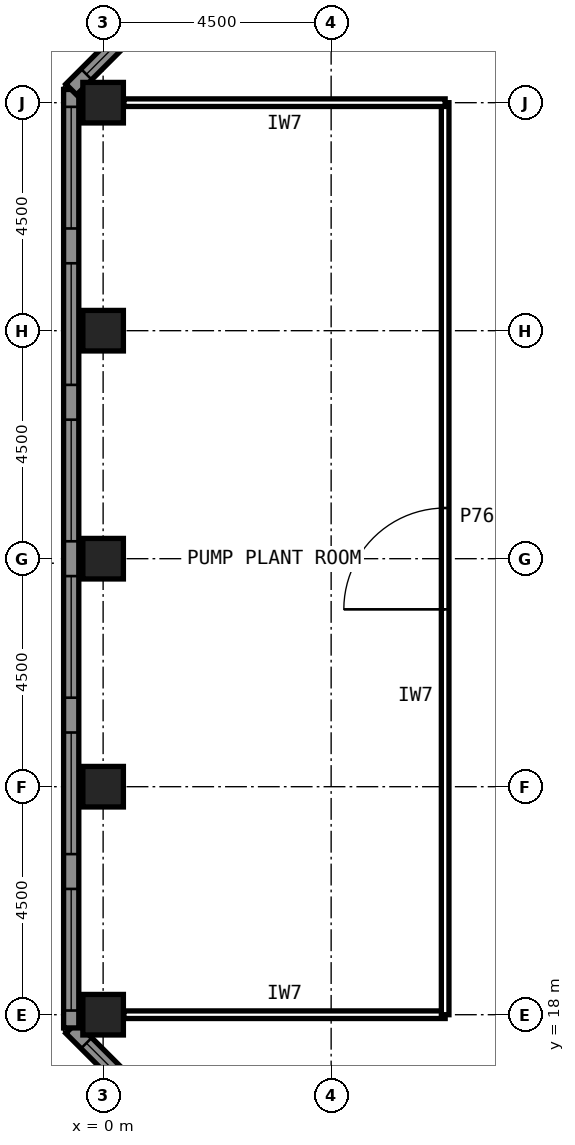
"""IFC4 building model, lengths in metres.
Left out: names, types, materials, properties, quantities, classifications, styles, units other than length and angle.
Written with IfcOpenShell. Run it as: python <this file> out.ifc"""

import sys

from ifc_helpers import new_model, si_unit, direction, frame, frame_2d, origin, origin_2d, place, context, subcontext, project, spatial, polyline, rectangle, hollow_rectangle, outline, extrude, element, fill, save


model = new_model("IFC4")
c1 = context("Model", 3, precision=1e-05, world=origin(), true_north=direction((0.0, 1.0)))
c2 = subcontext(c1, "Body", "Model", "MODEL_VIEW")
j1 = project(units=[si_unit("LENGTHUNIT", "METRE"), si_unit("PLANEANGLEUNIT", "RADIAN")], contexts=[c1])
p1 = place(None, origin())
s1 = spatial("IfcSite", under=j1, at=p1, CompositionType="ELEMENT")
p2 = place(p1, origin())
s2 = spatial("IfcBuilding", under=s1, at=p2, CompositionType="ELEMENT")
p3 = place(p2, frame((0.0, 0.0, 320.1)))
s3 = spatial("IfcBuildingStorey", under=s2, at=p3, CompositionType="ELEMENT", Elevation=320.1)
p4 = place(p3, frame((0.0, 36.0, 0.0), z_axis=(0.0, 0.0, 1.0), x_axis=(1.0, 0.0, 0.0)))
e1 = element("IfcColumn", 1, at=p4, inside=s3, PredefinedType="COLUMN", context=c2, shape_type="SweptSolid", body=[
    extrude(hollow_rectangle(XDim=0.8, YDim=0.8, WallThickness=0.045, at=origin_2d()), origin(), (0.0, 0.0, 1.0), 15.1),
])
p5 = place(p3, frame((0.0, 31.5, 0.0), z_axis=(0.0, 0.0, 1.0), x_axis=(1.0, 0.0, 0.0)))
e2 = element("IfcColumn", 2, at=p5, inside=s3, PredefinedType="COLUMN", context=c2, shape_type="SweptSolid", body=[
    extrude(hollow_rectangle(XDim=0.8, YDim=0.8, WallThickness=0.045, at=origin_2d()), origin(), (0.0, 0.0, 1.0), 14.677),
])
p6 = place(p3, frame((0.0, 27.0, 0.0), z_axis=(0.0, 0.0, 1.0), x_axis=(1.0, 0.0, 0.0)))
e3 = element("IfcColumn", 3, at=p6, inside=s3, PredefinedType="COLUMN", context=c2, shape_type="SweptSolid", body=[
    extrude(hollow_rectangle(XDim=0.8, YDim=0.8, WallThickness=0.045, at=origin_2d()), origin(), (0.0, 0.0, 1.0), 12.189),
])
p7 = place(p3, frame((0.0, 22.5, 0.0), z_axis=(0.0, 0.0, 1.0), x_axis=(1.0, 0.0, 0.0)))
e4 = element("IfcColumn", 4, at=p7, inside=s3, PredefinedType="COLUMN", context=c2, shape_type="SweptSolid", body=[
    extrude(hollow_rectangle(XDim=0.8, YDim=0.8, WallThickness=0.045, at=origin_2d()), origin(), (0.0, 0.0, 1.0), 11.977),
])
p8 = place(p3, frame((0.0, 18.0, 0.0), z_axis=(0.0, 0.0, 1.0), x_axis=(1.0, 0.0, 0.0)))
e5 = element("IfcColumn", 5, at=p8, inside=s3, PredefinedType="COLUMN", context=c2, shape_type="SweptSolid", body=[
    extrude(hollow_rectangle(XDim=0.8, YDim=0.8, WallThickness=0.045, at=origin_2d()), origin(), (0.0, 0.0, 1.0), 9.7),
])
p9 = place(p3, frame((17.739, -0.63, 0.0), z_axis=(0.0, 0.0, 1.0), x_axis=(-0.707106781187, 0.707106781187, 0.0)))
e6 = element("IfcWall", 6, at=p9, inside=s3, PredefinedType="SOLIDWALL", context=c2, shape_type="SweptSolid", body=[
    extrude(outline(polyline([(0.0, 0.0), (25.978, 0.0), (25.978, 12.722), (0.0, 7.211), (0.0, 0.0)])), frame((0.0, 0.15, 0.0), z_axis=(0.0, -1.0, 0.0), x_axis=(1.0, 0.0, 0.0)), (0.0, 0.0, 1.0), 0.3),
])
p10 = place(p9, frame((0.424, 0.0, 1.2)))
e7 = element("IfcOpeningElement", 7, at=p10, cuts=e6, PredefinedType="OPENING", context=c2, shape_type="SweptSolid", body=[
    extrude(rectangle(XDim=2.4, YDim=2.4, at=frame_2d((1.2, 1.2))), frame((0.0, 0.16, 0.0), z_axis=(0.0, -1.0, 0.0), x_axis=(1.0, 0.0, 0.0)), (0.0, 0.0, 1.0), 0.32),
])
p11 = place(p9, frame((3.671, 0.0, 1.2)))
e8 = element("IfcOpeningElement", 8, at=p11, cuts=e6, PredefinedType="OPENING", context=c2, shape_type="SweptSolid", body=[
    extrude(rectangle(XDim=2.4, YDim=2.4, at=frame_2d((1.2, 1.2))), frame((0.0, 0.16, 0.0), z_axis=(0.0, -1.0, 0.0), x_axis=(1.0, 0.0, 0.0)), (0.0, 0.0, 1.0), 0.32),
])
p12 = place(p9, frame((6.918, 0.0, 1.2)))
e9 = element("IfcOpeningElement", 9, at=p12, cuts=e6, PredefinedType="OPENING", context=c2, shape_type="SweptSolid", body=[
    extrude(rectangle(XDim=2.4, YDim=2.4, at=frame_2d((1.2, 1.2))), frame((0.0, 0.16, 0.0), z_axis=(0.0, -1.0, 0.0), x_axis=(1.0, 0.0, 0.0)), (0.0, 0.0, 1.0), 0.32),
])
p13 = place(p9, frame((10.165, 0.0, 1.2)))
e10 = element("IfcOpeningElement", 10, at=p13, cuts=e6, PredefinedType="OPENING", context=c2, shape_type="SweptSolid", body=[
    extrude(rectangle(XDim=2.4, YDim=2.4, at=frame_2d((1.2, 1.2))), frame((0.0, 0.16, 0.0), z_axis=(0.0, -1.0, 0.0), x_axis=(1.0, 0.0, 0.0)), (0.0, 0.0, 1.0), 0.32),
])
p14 = place(p9, frame((13.412, 0.0, 5.25)))
e11 = element("IfcOpeningElement", 11, at=p14, cuts=e6, PredefinedType="OPENING", context=c2, shape_type="SweptSolid", body=[
    extrude(rectangle(XDim=2.4, YDim=2.4, at=frame_2d((1.2, 1.2))), frame((0.0, 0.16, 0.0), z_axis=(0.0, -1.0, 0.0), x_axis=(1.0, 0.0, 0.0)), (0.0, 0.0, 1.0), 0.32),
])
p15 = place(p9, frame((16.66, 0.0, 5.35)))
e12 = element("IfcOpeningElement", 12, at=p15, cuts=e6, PredefinedType="OPENING", context=c2, shape_type="SweptSolid", body=[
    extrude(rectangle(XDim=2.4, YDim=2.4, at=frame_2d((1.2, 1.2))), frame((0.0, 0.16, 0.0), z_axis=(0.0, -1.0, 0.0), x_axis=(1.0, 0.0, 0.0)), (0.0, 0.0, 1.0), 0.32),
])
p16 = place(p9, frame((19.907, 0.0, 1.2)))
e13 = element("IfcOpeningElement", 13, at=p16, cuts=e6, PredefinedType="OPENING", context=c2, shape_type="SweptSolid", body=[
    extrude(rectangle(XDim=2.4, YDim=2.4, at=frame_2d((1.2, 1.2))), frame((0.0, 0.16, 0.0), z_axis=(0.0, -1.0, 0.0), x_axis=(1.0, 0.0, 0.0)), (0.0, 0.0, 1.0), 0.32),
])
p17 = place(p9, frame((23.154, 0.0, 1.2)))
e14 = element("IfcOpeningElement", 14, at=p17, cuts=e6, PredefinedType="OPENING", context=c2, shape_type="SweptSolid", body=[
    extrude(rectangle(XDim=2.4, YDim=2.4, at=frame_2d((1.2, 1.2))), frame((0.0, 0.16, 0.0), z_axis=(0.0, -1.0, 0.0), x_axis=(1.0, 0.0, 0.0)), (0.0, 0.0, 1.0), 0.32),
])
p18 = place(p3, frame((-0.63, 17.739, 0.0), z_axis=(0.0, 0.0, 1.0), x_axis=(0.0, 1.0, 0.0)))
e15 = element("IfcWall", 15, at=p18, inside=s3, PredefinedType="SOLIDWALL", context=c2, shape_type="SweptSolid", body=[
    extrude(outline(polyline([(0.0, 0.0), (18.522, 0.0), (18.522, 18.278), (0.0, 12.722), (0.0, 0.0)])), frame((0.0, 0.15, 0.0), z_axis=(0.0, -1.0, 0.0), x_axis=(1.0, 0.0, 0.0)), (0.0, 0.0, 1.0), 0.3),
])
p19 = place(p18, frame((0.344, 0.0, 5.45)))
e16 = element("IfcOpeningElement", 16, at=p19, cuts=e15, PredefinedType="OPENING", context=c2, shape_type="SweptSolid", body=[
    extrude(rectangle(XDim=2.4, YDim=2.4, at=frame_2d((1.2, 1.2))), frame((0.0, 0.16, 0.0), z_axis=(0.0, -1.0, 0.0), x_axis=(1.0, 0.0, 0.0)), (0.0, 0.0, 1.0), 0.32),
])
p20 = place(p18, frame((3.43, 0.0, 1.65)))
e17 = element("IfcOpeningElement", 17, at=p20, cuts=e15, PredefinedType="OPENING", context=c2, shape_type="SweptSolid", body=[
    extrude(rectangle(XDim=2.4, YDim=2.4, at=frame_2d((1.2, 1.2))), frame((0.0, 0.16, 0.0), z_axis=(0.0, -1.0, 0.0), x_axis=(1.0, 0.0, 0.0)), (0.0, 0.0, 1.0), 0.32),
])
p21 = place(p18, frame((6.518, 0.0, 5.15)))
e18 = element("IfcOpeningElement", 18, at=p21, cuts=e15, PredefinedType="OPENING", context=c2, shape_type="SweptSolid", body=[
    extrude(rectangle(XDim=2.4, YDim=2.4, at=frame_2d((1.2, 1.2))), frame((0.0, 0.16, 0.0), z_axis=(0.0, -1.0, 0.0), x_axis=(1.0, 0.0, 0.0)), (0.0, 0.0, 1.0), 0.32),
])
p22 = place(p18, frame((9.604, 0.0, 1.2)))
e19 = element("IfcOpeningElement", 19, at=p22, cuts=e15, PredefinedType="OPENING", context=c2, shape_type="SweptSolid", body=[
    extrude(rectangle(XDim=2.4, YDim=2.4, at=frame_2d((1.2, 1.2))), frame((0.0, 0.16, 0.0), z_axis=(0.0, -1.0, 0.0), x_axis=(1.0, 0.0, 0.0)), (0.0, 0.0, 1.0), 0.32),
])
p23 = place(p18, frame((12.691, 0.0, 1.2)))
e20 = element("IfcOpeningElement", 20, at=p23, cuts=e15, PredefinedType="OPENING", context=c2, shape_type="SweptSolid", body=[
    extrude(rectangle(XDim=2.4, YDim=2.4, at=frame_2d((1.2, 1.2))), frame((0.0, 0.16, 0.0), z_axis=(0.0, -1.0, 0.0), x_axis=(1.0, 0.0, 0.0)), (0.0, 0.0, 1.0), 0.32),
])
p24 = place(p18, frame((15.779, 0.0, 1.2)))
e21 = element("IfcOpeningElement", 21, at=p24, cuts=e15, PredefinedType="OPENING", context=c2, shape_type="SweptSolid", body=[
    extrude(rectangle(XDim=2.4, YDim=2.4, at=frame_2d((1.2, 1.2))), frame((0.0, 0.16, 0.0), z_axis=(0.0, -1.0, 0.0), x_axis=(1.0, 0.0, 0.0)), (0.0, 0.0, 1.0), 0.32),
])
p25 = place(p3, frame((-0.63, 36.261, 0.0), z_axis=(0.0, 0.0, 1.0), x_axis=(0.707106781187, 0.707106781187, 0.0)))
e22 = element("IfcWall", 22, at=p25, inside=s3, PredefinedType="SOLIDWALL", context=c2, shape_type="SweptSolid", body=[
    extrude(outline(polyline([(0.0, 0.0), (25.978, 0.0), (25.978, 23.789), (0.0, 18.278), (0.0, 0.0)])), frame((0.0, 0.15, 0.0), z_axis=(0.0, -1.0, 0.0), x_axis=(1.0, 0.0, 0.0)), (0.0, 0.0, 1.0), 0.3),
])
p26 = place(p25, frame((0.424, 0.0, 1.2)))
e23 = element("IfcOpeningElement", 23, at=p26, cuts=e22, PredefinedType="OPENING", context=c2, shape_type="SweptSolid", body=[
    extrude(rectangle(XDim=2.4, YDim=2.4, at=frame_2d((1.2, 1.2))), frame((0.0, 0.16, 0.0), z_axis=(0.0, -1.0, 0.0), x_axis=(1.0, 0.0, 0.0)), (0.0, 0.0, 1.0), 0.32),
])
p27 = place(p25, frame((3.671, 0.0, 1.2)))
e24 = element("IfcOpeningElement", 24, at=p27, cuts=e22, PredefinedType="OPENING", context=c2, shape_type="SweptSolid", body=[
    extrude(rectangle(XDim=2.4, YDim=2.4, at=frame_2d((1.2, 1.2))), frame((0.0, 0.16, 0.0), z_axis=(0.0, -1.0, 0.0), x_axis=(1.0, 0.0, 0.0)), (0.0, 0.0, 1.0), 0.32),
])
p28 = place(p25, frame((6.918, 0.0, 1.2)))
e25 = element("IfcOpeningElement", 25, at=p28, cuts=e22, PredefinedType="OPENING", context=c2, shape_type="SweptSolid", body=[
    extrude(rectangle(XDim=2.4, YDim=2.4, at=frame_2d((1.2, 1.2))), frame((0.0, 0.16, 0.0), z_axis=(0.0, -1.0, 0.0), x_axis=(1.0, 0.0, 0.0)), (0.0, 0.0, 1.0), 0.32),
])
p29 = place(p25, frame((10.165, 0.0, 1.2)))
e26 = element("IfcOpeningElement", 26, at=p29, cuts=e22, PredefinedType="OPENING", context=c2, shape_type="SweptSolid", body=[
    extrude(rectangle(XDim=2.4, YDim=2.4, at=frame_2d((1.2, 1.2))), frame((0.0, 0.16, 0.0), z_axis=(0.0, -1.0, 0.0), x_axis=(1.0, 0.0, 0.0)), (0.0, 0.0, 1.0), 0.32),
])
p30 = place(p25, frame((13.412, 0.0, 11.15)))
e27 = element("IfcOpeningElement", 27, at=p30, cuts=e22, PredefinedType="OPENING", context=c2, shape_type="SweptSolid", body=[
    extrude(rectangle(XDim=2.4, YDim=2.4, at=frame_2d((1.2, 1.2))), frame((0.0, 0.16, 0.0), z_axis=(0.0, -1.0, 0.0), x_axis=(1.0, 0.0, 0.0)), (0.0, 0.0, 1.0), 0.32),
])
p31 = place(p25, frame((16.66, 0.0, 11.3)))
e28 = element("IfcOpeningElement", 28, at=p31, cuts=e22, PredefinedType="OPENING", context=c2, shape_type="SweptSolid", body=[
    extrude(rectangle(XDim=2.4, YDim=2.4, at=frame_2d((1.2, 1.2))), frame((0.0, 0.16, 0.0), z_axis=(0.0, -1.0, 0.0), x_axis=(1.0, 0.0, 0.0)), (0.0, 0.0, 1.0), 0.32),
])
p32 = place(p25, frame((19.907, 0.0, 1.2)))
e29 = element("IfcOpeningElement", 29, at=p32, cuts=e22, PredefinedType="OPENING", context=c2, shape_type="SweptSolid", body=[
    extrude(rectangle(XDim=2.4, YDim=2.4, at=frame_2d((1.2, 1.2))), frame((0.0, 0.16, 0.0), z_axis=(0.0, -1.0, 0.0), x_axis=(1.0, 0.0, 0.0)), (0.0, 0.0, 1.0), 0.32),
])
p33 = place(p25, frame((23.154, 0.0, 1.2)))
e30 = element("IfcOpeningElement", 30, at=p33, cuts=e22, PredefinedType="OPENING", context=c2, shape_type="SweptSolid", body=[
    extrude(rectangle(XDim=2.4, YDim=2.4, at=frame_2d((1.2, 1.2))), frame((0.0, 0.16, 0.0), z_axis=(0.0, -1.0, 0.0), x_axis=(1.0, 0.0, 0.0)), (0.0, 0.0, 1.0), 0.32),
])
p34 = place(p3, frame((0.41, 18.0, 0.0), z_axis=(0.0, 0.0, 1.0), x_axis=(1.0, 0.0, 0.0)))
e31 = element("IfcWall", 31, at=p34, inside=s3, PredefinedType="PARTITIONING", context=c2, shape_type="SweptSolid", body=[
    extrude(rectangle(XDim=6.34, YDim=0.15, at=frame_2d((3.17, 0.0))), origin(), (0.0, 0.0, 1.0), 4.246),
])
p35 = place(p3, frame((6.75, 18.0, 0.0), z_axis=(0.0, 0.0, 1.0), x_axis=(0.0, 1.0, 0.0)))
e32 = element("IfcWall", 32, at=p35, inside=s3, PredefinedType="PARTITIONING", context=c2, shape_type="SweptSolid", body=[
    extrude(rectangle(XDim=18.0, YDim=0.15, at=frame_2d((9.0, 0.0))), origin(), (0.0, 0.0, 1.0), 4.246),
])
p36 = place(p35, frame((8.0, 0.0, 0.0)))
e33 = element("IfcOpeningElement", 33, at=p36, cuts=e32, PredefinedType="OPENING", context=c2, shape_type="SweptSolid", body=[
    extrude(rectangle(XDim=2.0, YDim=2.4, at=frame_2d((1.0, 1.2))), frame((0.0, 0.085, 0.0), z_axis=(0.0, -1.0, 0.0), x_axis=(1.0, 0.0, 0.0)), (0.0, 0.0, 1.0), 0.17),
])
p37 = place(p3, frame((6.75, 36.0, 0.0), z_axis=(0.0, 0.0, 1.0), x_axis=(-1.0, 0.0, 0.0)))
e34 = element("IfcWall", 34, at=p37, inside=s3, PredefinedType="PARTITIONING", context=c2, shape_type="SweptSolid", body=[
    extrude(rectangle(XDim=6.34, YDim=0.15, at=frame_2d((3.17, 0.0))), origin(), (0.0, 0.0, 1.0), 4.246),
])
p38 = place(p17, origin())
e35 = element("IfcWindow", 35, at=p38, inside=s3, PartitioningType="SINGLE_PANEL", PredefinedType="USERDEFINED", context=c2, shape_type="SweptSolid", body=[
    extrude(rectangle(XDim=2.4, YDim=2.4, at=frame_2d((1.2, 1.2))), frame((0.0, 0.03, 0.0), z_axis=(0.0, -1.0, 0.0), x_axis=(1.0, 0.0, 0.0)), (0.0, 0.0, 1.0), 0.06),
])
fill(e14, e35)
p39 = place(p19, origin())
e36 = element("IfcWindow", 36, at=p39, inside=s3, PartitioningType="SINGLE_PANEL", PredefinedType="USERDEFINED", context=c2, shape_type="SweptSolid", body=[
    extrude(rectangle(XDim=2.4, YDim=2.4, at=frame_2d((1.2, 1.2))), frame((0.0, 0.03, 0.0), z_axis=(0.0, -1.0, 0.0), x_axis=(1.0, 0.0, 0.0)), (0.0, 0.0, 1.0), 0.06),
])
fill(e16, e36)
p40 = place(p20, origin())
e37 = element("IfcWindow", 37, at=p40, inside=s3, PartitioningType="SINGLE_PANEL", PredefinedType="USERDEFINED", context=c2, shape_type="SweptSolid", body=[
    extrude(rectangle(XDim=2.4, YDim=2.4, at=frame_2d((1.2, 1.2))), frame((0.0, 0.03, 0.0), z_axis=(0.0, -1.0, 0.0), x_axis=(1.0, 0.0, 0.0)), (0.0, 0.0, 1.0), 0.06),
])
fill(e17, e37)
p41 = place(p21, origin())
e38 = element("IfcWindow", 38, at=p41, inside=s3, PartitioningType="SINGLE_PANEL", PredefinedType="USERDEFINED", context=c2, shape_type="SweptSolid", body=[
    extrude(rectangle(XDim=2.4, YDim=2.4, at=frame_2d((1.2, 1.2))), frame((0.0, 0.03, 0.0), z_axis=(0.0, -1.0, 0.0), x_axis=(1.0, 0.0, 0.0)), (0.0, 0.0, 1.0), 0.06),
])
fill(e18, e38)
p42 = place(p22, origin())
e39 = element("IfcWindow", 39, at=p42, inside=s3, PartitioningType="SINGLE_PANEL", PredefinedType="USERDEFINED", context=c2, shape_type="SweptSolid", body=[
    extrude(rectangle(XDim=2.4, YDim=2.4, at=frame_2d((1.2, 1.2))), frame((0.0, 0.03, 0.0), z_axis=(0.0, -1.0, 0.0), x_axis=(1.0, 0.0, 0.0)), (0.0, 0.0, 1.0), 0.06),
])
fill(e19, e39)
p43 = place(p23, origin())
e40 = element("IfcWindow", 40, at=p43, inside=s3, PartitioningType="SINGLE_PANEL", PredefinedType="USERDEFINED", context=c2, shape_type="SweptSolid", body=[
    extrude(rectangle(XDim=2.4, YDim=2.4, at=frame_2d((1.2, 1.2))), frame((0.0, 0.03, 0.0), z_axis=(0.0, -1.0, 0.0), x_axis=(1.0, 0.0, 0.0)), (0.0, 0.0, 1.0), 0.06),
])
fill(e20, e40)
p44 = place(p24, origin())
e41 = element("IfcWindow", 41, at=p44, inside=s3, PartitioningType="SINGLE_PANEL", PredefinedType="USERDEFINED", context=c2, shape_type="SweptSolid", body=[
    extrude(rectangle(XDim=2.4, YDim=2.4, at=frame_2d((1.2, 1.2))), frame((0.0, 0.03, 0.0), z_axis=(0.0, -1.0, 0.0), x_axis=(1.0, 0.0, 0.0)), (0.0, 0.0, 1.0), 0.06),
])
fill(e21, e41)
p45 = place(p26, origin())
e42 = element("IfcWindow", 42, at=p45, inside=s3, PartitioningType="SINGLE_PANEL", PredefinedType="USERDEFINED", context=c2, shape_type="SweptSolid", body=[
    extrude(rectangle(XDim=2.4, YDim=2.4, at=frame_2d((1.2, 1.2))), frame((0.0, 0.03, 0.0), z_axis=(0.0, -1.0, 0.0), x_axis=(1.0, 0.0, 0.0)), (0.0, 0.0, 1.0), 0.06),
])
fill(e23, e42)
p46 = place(p36, origin())
e43 = element("IfcDoor", 43, at=p46, inside=s3, OperationType="SINGLE_SWING_LEFT", PredefinedType="DOOR", context=c2, shape_type="SweptSolid", body=[
    extrude(rectangle(XDim=2.0, YDim=2.4, at=frame_2d((1.0, 1.2))), frame((0.0, 0.025, 0.0), z_axis=(0.0, -1.0, 0.0), x_axis=(1.0, 0.0, 0.0)), (0.0, 0.0, 1.0), 0.05),
])
fill(e33, e43)
save(model, sys.argv[1])
